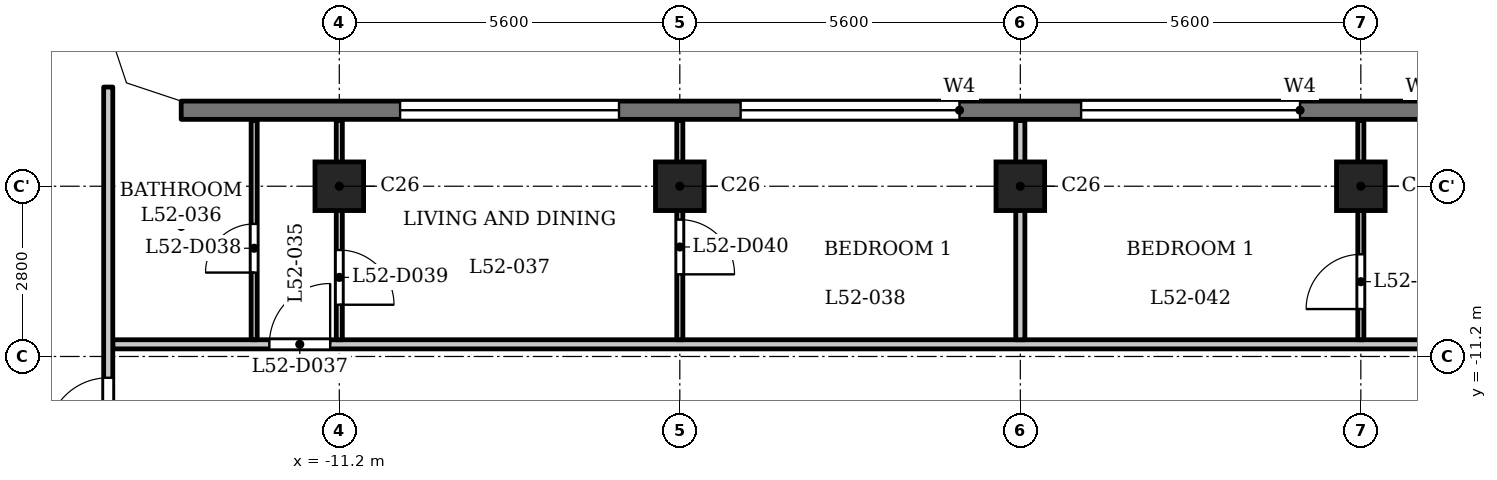
"""IFC4 building model, lengths in metres.
Left out: names, types, materials, properties, quantities, classifications, styles, units other than length and angle.
Written with IfcOpenShell. Run it as: python <this file> out.ifc"""

import sys

from ifc_helpers import new_model, si_unit, direction, frame, frame_2d, origin, origin_2d, place, context, subcontext, project, spatial, polyline, rectangle, outline, extrude, element, fill, save


model = new_model("IFC4")
c1 = context("Model", 3, precision=1e-05, world=origin(), true_north=direction((0.0, 1.0)))
c2 = subcontext(c1, "Body", "Model", "MODEL_VIEW")
j1 = project(units=[si_unit("LENGTHUNIT", "METRE"), si_unit("PLANEANGLEUNIT", "RADIAN")], contexts=[c1])
p1 = place(None, origin())
s1 = spatial("IfcSite", under=j1, at=p1, CompositionType="ELEMENT")
p2 = place(p1, origin())
s2 = spatial("IfcBuilding", under=s1, at=p2, CompositionType="ELEMENT")
p3 = place(p2, frame((0.0, 0.0, 202.9)))
s3 = spatial("IfcBuildingStorey", under=s2, at=p3, CompositionType="ELEMENT", Elevation=202.9)
for number, where, z_axis, x_axis in (
    (1, (-11.2, -8.4, 0.0), (0.0, 0.0, 1.0), (1.0, 0.0, 0.0)),
    (2, (-5.6, -8.4, 0.0), (0.0, 0.0, 1.0), (1.0, 0.0, 0.0)),
    (3, (0.0, -8.4, 0.0), (0.0, 0.0, 1.0), (1.0, 0.0, 0.0)),
    (4, (5.6, -8.4, 0.0), (0.0, 0.0, 1.0), (1.0, 0.0, 0.0)),
):
    element("IfcColumn", number, at=place(p3, frame(where, z_axis=z_axis, x_axis=x_axis)), inside=s3, PredefinedType="COLUMN", context=c2, shape_type="SweptSolid", body=[
        extrude(rectangle(XDim=0.8, YDim=0.8, at=origin_2d()), origin(), (0.0, 0.0, 1.0), 3.5),
    ])
p4 = place(p3, frame((13.8, -7.15, 0.0), z_axis=(0.0, 0.0, 1.0), x_axis=(-1.0, 0.0, 0.0)))
e5 = element("IfcWall", 5, at=p4, inside=s3, PredefinedType="SOLIDWALL", context=c2, shape_type="SweptSolid", body=[
    extrude(rectangle(XDim=27.6, YDim=0.3, at=frame_2d((13.8, 0.0))), origin(), (0.0, 0.0, 1.0), 3.2),
])
p5 = place(p4, frame((3.6, 0.0, 1.2)))
e6 = element("IfcOpeningElement", 6, at=p5, cuts=e5, PredefinedType="OPENING", context=c2, shape_type="SweptSolid", body=[
    extrude(rectangle(XDim=3.6, YDim=0.95, at=frame_2d((1.8, 0.475))), frame((0.0, 0.16, 0.0), z_axis=(0.0, -1.0, 0.0), x_axis=(1.0, 0.0, 0.0)), (0.0, 0.0, 1.0), 0.32),
])
p6 = place(p4, frame((9.2, 0.0, 1.2)))
e7 = element("IfcOpeningElement", 7, at=p6, cuts=e5, PredefinedType="OPENING", context=c2, shape_type="SweptSolid", body=[
    extrude(rectangle(XDim=3.6, YDim=0.95, at=frame_2d((1.8, 0.475))), frame((0.0, 0.16, 0.0), z_axis=(0.0, -1.0, 0.0), x_axis=(1.0, 0.0, 0.0)), (0.0, 0.0, 1.0), 0.32),
])
p7 = place(p4, frame((14.8, 0.0, 1.2)))
e8 = element("IfcOpeningElement", 8, at=p7, cuts=e5, PredefinedType="OPENING", context=c2, shape_type="SweptSolid", body=[
    extrude(rectangle(XDim=3.6, YDim=0.95, at=frame_2d((1.8, 0.475))), frame((0.0, 0.16, 0.0), z_axis=(0.0, -1.0, 0.0), x_axis=(1.0, 0.0, 0.0)), (0.0, 0.0, 1.0), 0.32),
])
p8 = place(p4, frame((20.4, 0.0, 1.2)))
e9 = element("IfcOpeningElement", 9, at=p8, cuts=e5, PredefinedType="OPENING", context=c2, shape_type="SweptSolid", body=[
    extrude(rectangle(XDim=3.6, YDim=0.95, at=frame_2d((1.8, 0.475))), frame((0.0, 0.16, 0.0), z_axis=(0.0, -1.0, 0.0), x_axis=(1.0, 0.0, 0.0)), (0.0, 0.0, 1.0), 0.32),
])
p9 = place(p3, frame((-14.925, -11.0, 0.0), z_axis=(0.0, 0.0, 1.0), x_axis=(1.0, 0.0, 0.0)))
e10 = element("IfcWall", 10, at=p9, inside=s3, PredefinedType="PARTITIONING", context=c2, shape_type="SweptSolid", body=[
    extrude(rectangle(XDim=29.85, YDim=0.15, at=frame_2d((14.925, 0.0))), origin(), (0.0, 0.0, 1.0), 3.2),
])
p10 = place(p9, frame((2.575, 0.0, 0.0)))
e11 = element("IfcOpeningElement", 11, at=p10, cuts=e10, PredefinedType="OPENING", context=c2, shape_type="SweptSolid", body=[
    extrude(rectangle(XDim=1.0, YDim=2.1, at=frame_2d((0.5, 1.05))), frame((0.0, 0.085, 0.0), z_axis=(0.0, -1.0, 0.0), x_axis=(1.0, 0.0, 0.0)), (0.0, 0.0, 1.0), 0.17),
])
p11 = place(p9, frame((26.375, 0.0, 0.0)))
e12 = element("IfcOpeningElement", 12, at=p11, cuts=e10, PredefinedType="OPENING", context=c2, shape_type="SweptSolid", body=[
    extrude(rectangle(XDim=1.0, YDim=2.1, at=frame_2d((0.5, 1.05))), frame((0.0, 0.085, 0.0), z_axis=(0.0, -1.0, 0.0), x_axis=(1.0, 0.0, 0.0)), (0.0, 0.0, 1.0), 0.17),
])
p12 = place(p3, frame((-15.0, -13.125, 0.0), z_axis=(0.0, 0.0, 1.0), x_axis=(0.0, 1.0, 0.0)))
e13 = element("IfcWall", 13, at=p12, inside=s3, PredefinedType="PARTITIONING", context=c2, shape_type="SweptSolid", body=[
    extrude(rectangle(XDim=6.356, YDim=0.15, at=frame_2d((3.178, 0.0))), origin(), (0.0, 0.0, 1.0), 3.2),
])
p13 = place(p12, frame((0.575, 0.0, 0.0)))
e14 = element("IfcOpeningElement", 14, at=p13, cuts=e13, PredefinedType="OPENING", context=c2, shape_type="SweptSolid", body=[
    extrude(rectangle(XDim=1.0, YDim=2.1, at=frame_2d((0.5, 1.05))), frame((0.0, 0.085, 0.0), z_axis=(0.0, -1.0, 0.0), x_axis=(1.0, 0.0, 0.0)), (0.0, 0.0, 1.0), 0.17),
])
p14 = place(p3, frame((-12.6, -10.925, 0.0), z_axis=(0.0, 0.0, 1.0), x_axis=(0.0, 1.0, 0.0)))
e15 = element("IfcWall", 15, at=p14, inside=s3, PredefinedType="PARTITIONING", context=c2, shape_type="SweptSolid", body=[
    extrude(rectangle(XDim=3.605, YDim=0.1, at=frame_2d((1.802, 0.0))), origin(), (0.0, 0.0, 1.0), 3.2),
])
p15 = place(p14, frame((1.105, 0.0, 0.0)))
e16 = element("IfcOpeningElement", 16, at=p15, cuts=e15, PredefinedType="OPENING", context=c2, shape_type="SweptSolid", body=[
    extrude(rectangle(XDim=0.8, YDim=2.1, at=frame_2d((0.4, 1.05))), frame((0.0, 0.06, 0.0), z_axis=(0.0, -1.0, 0.0), x_axis=(1.0, 0.0, 0.0)), (0.0, 0.0, 1.0), 0.12),
])
p16 = place(p3, frame((-11.2, -10.925, 0.0), z_axis=(0.0, 0.0, 1.0), x_axis=(0.0, 1.0, 0.0)))
e17 = element("IfcWall", 17, at=p16, inside=s3, PredefinedType="PARTITIONING", context=c2, shape_type="SweptSolid", body=[
    extrude(rectangle(XDim=3.605, YDim=0.1, at=frame_2d((1.802, 0.0))), origin(), (0.0, 0.0, 1.0), 3.2),
])
p17 = place(p16, frame((0.576, 0.0, 0.0)))
e18 = element("IfcOpeningElement", 18, at=p17, cuts=e17, PredefinedType="OPENING", context=c2, shape_type="SweptSolid", body=[
    extrude(rectangle(XDim=0.9, YDim=2.1, at=frame_2d((0.45, 1.05))), frame((0.0, 0.06, 0.0), z_axis=(0.0, -1.0, 0.0), x_axis=(1.0, 0.0, 0.0)), (0.0, 0.0, 1.0), 0.12),
])
p18 = place(p3, frame((-5.6, -10.925, 0.0), z_axis=(0.0, 0.0, 1.0), x_axis=(0.0, 1.0, 0.0)))
e19 = element("IfcWall", 19, at=p18, inside=s3, PredefinedType="PARTITIONING", context=c2, shape_type="SweptSolid", body=[
    extrude(rectangle(XDim=3.605, YDim=0.1, at=frame_2d((1.802, 0.0))), origin(), (0.0, 0.0, 1.0), 3.2),
])
p19 = place(p18, frame((1.076, 0.0, 0.0)))
e20 = element("IfcOpeningElement", 20, at=p19, cuts=e19, PredefinedType="OPENING", context=c2, shape_type="SweptSolid", body=[
    extrude(rectangle(XDim=0.9, YDim=2.1, at=frame_2d((0.45, 1.05))), frame((0.0, 0.06, 0.0), z_axis=(0.0, -1.0, 0.0), x_axis=(1.0, 0.0, 0.0)), (0.0, 0.0, 1.0), 0.12),
])
p20 = place(p3, frame((0.0, -10.925, 0.0), z_axis=(0.0, 0.0, 1.0), x_axis=(0.0, 1.0, 0.0)))
e21 = element("IfcWall", 21, at=p20, inside=s3, PredefinedType="PARTITIONING", context=c2, shape_type="SweptSolid", body=[
    extrude(rectangle(XDim=3.605, YDim=0.15, at=frame_2d((1.802, 0.0))), origin(), (0.0, 0.0, 1.0), 3.2),
])
p21 = place(p3, frame((5.6, -10.925, 0.0), z_axis=(0.0, 0.0, 1.0), x_axis=(0.0, 1.0, 0.0)))
e22 = element("IfcWall", 22, at=p21, inside=s3, PredefinedType="PARTITIONING", context=c2, shape_type="SweptSolid", body=[
    extrude(rectangle(XDim=3.605, YDim=0.1, at=frame_2d((1.802, 0.0))), origin(), (0.0, 0.0, 1.0), 3.2),
])
p22 = place(p21, frame((0.505, 0.0, 0.0)))
e23 = element("IfcOpeningElement", 23, at=p22, cuts=e22, PredefinedType="OPENING", context=c2, shape_type="SweptSolid", body=[
    extrude(rectangle(XDim=0.9, YDim=2.1, at=frame_2d((0.45, 1.05))), frame((0.0, 0.06, 0.0), z_axis=(0.0, -1.0, 0.0), x_axis=(1.0, 0.0, 0.0)), (0.0, 0.0, 1.0), 0.12),
])
p23 = place(p3, origin())
e24 = element("IfcWall", 24, at=p23, inside=s3, PredefinedType="SOLIDWALL", context=c2, shape_type="SweptSolid", body=[
    extrude(outline(polyline([(-14.937, -6.937), (-13.849, -7.3), (-13.8, -7.3), (-13.8, -7.0), (-14.7, -6.7), (-15.0, -5.8), (-15.3, -5.8), (-15.3, -5.849), (-14.937, -6.937)])), origin(), (0.0, 0.0, 1.0), 3.2),
])
p24 = place(p13, origin())
e25 = element("IfcDoor", 25, at=p24, inside=s3, OperationType="SINGLE_SWING_RIGHT", PredefinedType="DOOR", context=c2, shape_type="SweptSolid", body=[
    extrude(rectangle(XDim=1.0, YDim=2.1, at=frame_2d((0.5, 1.05))), frame((0.0, 0.025, 0.0), z_axis=(0.0, -1.0, 0.0), x_axis=(1.0, 0.0, 0.0)), (0.0, 0.0, 1.0), 0.05),
])
fill(e14, e25)
p25 = place(p10, origin())
e26 = element("IfcDoor", 26, at=p25, inside=s3, OperationType="SINGLE_SWING_LEFT", PredefinedType="DOOR", context=c2, shape_type="SweptSolid", body=[
    extrude(rectangle(XDim=1.0, YDim=2.1, at=frame_2d((0.5, 1.05))), frame((0.0, 0.025, 0.0), z_axis=(0.0, -1.0, 0.0), x_axis=(1.0, 0.0, 0.0)), (0.0, 0.0, 1.0), 0.05),
])
fill(e11, e26)
p26 = place(p15, origin())
e27 = element("IfcDoor", 27, at=p26, inside=s3, OperationType="SINGLE_SWING_RIGHT", PredefinedType="DOOR", context=c2, shape_type="SweptSolid", body=[
    extrude(rectangle(XDim=0.8, YDim=2.1, at=frame_2d((0.4, 1.05))), frame((0.0, 0.025, 0.0), z_axis=(0.0, -1.0, 0.0), x_axis=(1.0, 0.0, 0.0)), (0.0, 0.0, 1.0), 0.05),
])
fill(e16, e27)
p27 = place(p17, origin())
e28 = element("IfcDoor", 28, at=p27, inside=s3, OperationType="SINGLE_SWING_LEFT", PredefinedType="DOOR", context=c2, shape_type="SweptSolid", body=[
    extrude(rectangle(XDim=0.9, YDim=2.1, at=frame_2d((0.45, 1.05))), frame((0.0, 0.025, 0.0), z_axis=(0.0, -1.0, 0.0), x_axis=(1.0, 0.0, 0.0)), (0.0, 0.0, 1.0), 0.05),
])
fill(e18, e28)
p28 = place(p19, origin())
e29 = element("IfcDoor", 29, at=p28, inside=s3, OperationType="SINGLE_SWING_LEFT", PredefinedType="DOOR", context=c2, shape_type="SweptSolid", body=[
    extrude(rectangle(XDim=0.9, YDim=2.1, at=frame_2d((0.45, 1.05))), frame((0.0, 0.025, 0.0), z_axis=(0.0, -1.0, 0.0), x_axis=(1.0, 0.0, 0.0)), (0.0, 0.0, 1.0), 0.05),
])
fill(e20, e29)
p29 = place(p22, origin())
e30 = element("IfcDoor", 30, at=p29, inside=s3, OperationType="SINGLE_SWING_RIGHT", PredefinedType="DOOR", context=c2, shape_type="SweptSolid", body=[
    extrude(rectangle(XDim=0.9, YDim=2.1, at=frame_2d((0.45, 1.05))), frame((0.0, 0.025, 0.0), z_axis=(0.0, -1.0, 0.0), x_axis=(1.0, 0.0, 0.0)), (0.0, 0.0, 1.0), 0.05),
])
fill(e23, e30)
p30 = place(p6, origin())
e31 = element("IfcWindow", 31, at=p30, inside=s3, PartitioningType="SINGLE_PANEL", PredefinedType="WINDOW", context=c2, shape_type="SweptSolid", body=[
    extrude(rectangle(XDim=3.6, YDim=0.95, at=frame_2d((1.8, 0.475))), frame((0.0, 0.03, 0.0), z_axis=(0.0, -1.0, 0.0), x_axis=(1.0, 0.0, 0.0)), (0.0, 0.0, 1.0), 0.06),
])
fill(e7, e31)
p31 = place(p7, origin())
e32 = element("IfcWindow", 32, at=p31, inside=s3, PartitioningType="SINGLE_PANEL", PredefinedType="WINDOW", context=c2, shape_type="SweptSolid", body=[
    extrude(rectangle(XDim=3.6, YDim=0.95, at=frame_2d((1.8, 0.475))), frame((0.0, 0.03, 0.0), z_axis=(0.0, -1.0, 0.0), x_axis=(1.0, 0.0, 0.0)), (0.0, 0.0, 1.0), 0.06),
])
fill(e8, e32)
p32 = place(p8, origin())
e33 = element("IfcWindow", 33, at=p32, inside=s3, PartitioningType="SINGLE_PANEL", PredefinedType="WINDOW", context=c2, shape_type="SweptSolid", body=[
    extrude(rectangle(XDim=3.6, YDim=0.95, at=frame_2d((1.8, 0.475))), frame((0.0, 0.03, 0.0), z_axis=(0.0, -1.0, 0.0), x_axis=(1.0, 0.0, 0.0)), (0.0, 0.0, 1.0), 0.06),
])
fill(e9, e33)
save(model, sys.argv[1])
